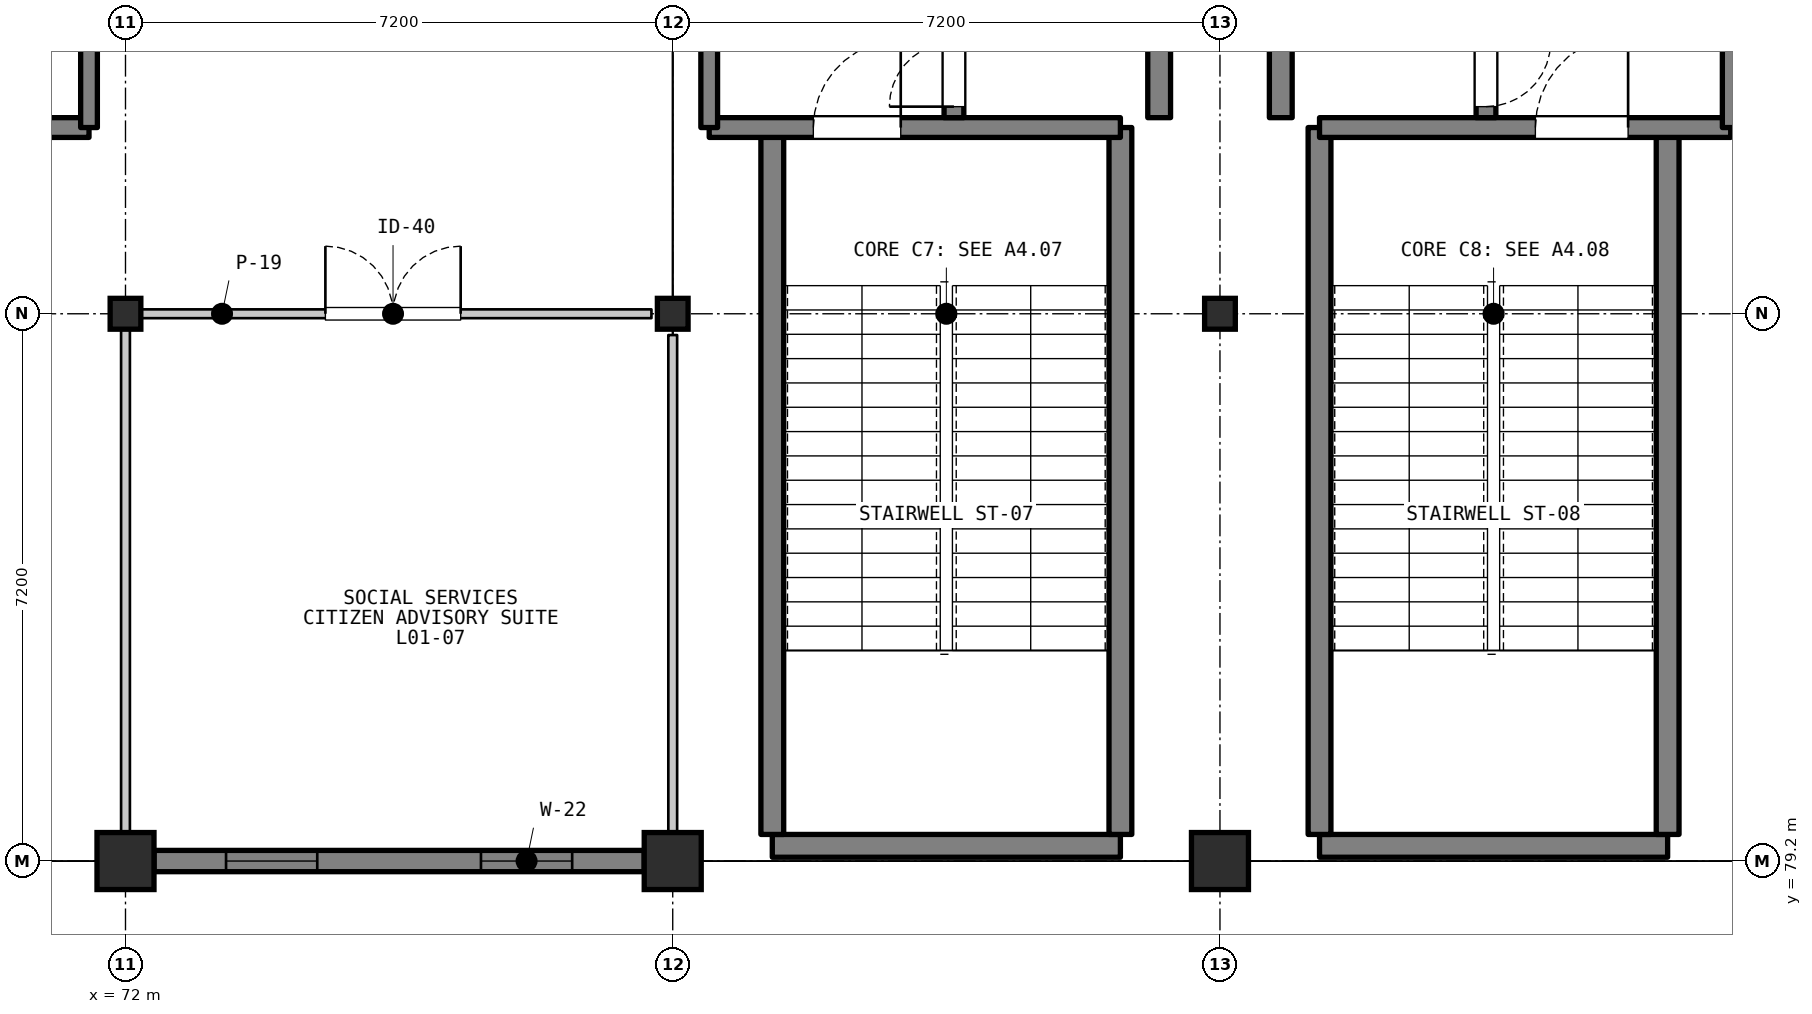
"""IFC4 building model, lengths in metres.
Left out: names, types, materials, properties, quantities, classifications, styles, units other than length and angle.
Written with IfcOpenShell. Run it as: python <this file> out.ifc"""

import sys

from ifc_helpers import new_model, si_unit, direction, frame, frame_2d, origin, origin_2d, place, context, subcontext, project, spatial, rectangle, i_section, extrude, element, fill, save


model = new_model("IFC4")
c1 = context("Model", 3, precision=1e-05, world=origin(), true_north=direction((0.0, 1.0)))
c2 = subcontext(c1, "Body", "Model", "MODEL_VIEW")
j1 = project(units=[si_unit("LENGTHUNIT", "METRE"), si_unit("PLANEANGLEUNIT", "RADIAN")], contexts=[c1])
p1 = place(None, origin())
s1 = spatial("IfcSite", under=j1, at=p1, CompositionType="ELEMENT")
p2 = place(p1, origin())
s2 = spatial("IfcBuilding", under=s1, at=p2, CompositionType="ELEMENT")
p3 = place(p2, origin())
s3 = spatial("IfcBuildingStorey", under=s2, at=p3, CompositionType="ELEMENT", Elevation=0.0)
p4 = place(p3, frame((72.0, 79.2, 0.0), z_axis=(0.0, 0.0, 1.0), x_axis=(1.0, 0.0, 0.0)))
e1 = element("IfcColumn", 1, at=p4, inside=s3, PredefinedType="COLUMN", context=c2, shape_type="SweptSolid", body=[
    extrude(rectangle(XDim=0.75, YDim=0.75, at=origin_2d()), origin(), (0.0, 0.0, 1.0), 5.4),
])
p5 = place(p3, frame((72.0, 86.4, 0.0), z_axis=(0.0, 0.0, 1.0), x_axis=(1.0, 0.0, 0.0)))
e2 = element("IfcColumn", 2, at=p5, inside=s3, PredefinedType="COLUMN", context=c2, shape_type="SweptSolid", body=[
    extrude(i_section(OverallWidth=0.404, OverallDepth=0.406, WebThickness=0.027, FlangeThickness=0.044, FilletRadius=0.015, at=origin_2d()), origin(), (0.0, 0.0, 1.0), 5.4),
])
p6 = place(p3, frame((79.2, 79.2, 0.0), z_axis=(0.0, 0.0, 1.0), x_axis=(1.0, 0.0, 0.0)))
e3 = element("IfcColumn", 3, at=p6, inside=s3, PredefinedType="COLUMN", context=c2, shape_type="SweptSolid", body=[
    extrude(rectangle(XDim=0.75, YDim=0.75, at=origin_2d()), origin(), (0.0, 0.0, 1.0), 5.4),
])
p7 = place(p3, frame((79.2, 86.4, 0.0), z_axis=(0.0, 0.0, 1.0), x_axis=(1.0, 0.0, 0.0)))
e4 = element("IfcColumn", 4, at=p7, inside=s3, PredefinedType="COLUMN", context=c2, shape_type="SweptSolid", body=[
    extrude(i_section(OverallWidth=0.404, OverallDepth=0.406, WebThickness=0.027, FlangeThickness=0.044, FilletRadius=0.015, at=origin_2d()), origin(), (0.0, 0.0, 1.0), 5.4),
])
p8 = place(p3, frame((86.4, 79.2, 0.0), z_axis=(0.0, 0.0, 1.0), x_axis=(1.0, 0.0, 0.0)))
e5 = element("IfcColumn", 5, at=p8, inside=s3, PredefinedType="COLUMN", context=c2, shape_type="SweptSolid", body=[
    extrude(rectangle(XDim=0.75, YDim=0.75, at=origin_2d()), origin(), (0.0, 0.0, 1.0), 5.4),
])
p9 = place(p3, frame((86.4, 86.4, 0.0), z_axis=(0.0, 0.0, 1.0), x_axis=(1.0, 0.0, 0.0)))
e6 = element("IfcColumn", 6, at=p9, inside=s3, PredefinedType="COLUMN", context=c2, shape_type="SweptSolid", body=[
    extrude(i_section(OverallWidth=0.404, OverallDepth=0.406, WebThickness=0.027, FlangeThickness=0.044, FilletRadius=0.015, at=origin_2d()), origin(), (0.0, 0.0, 1.0), 5.4),
])
p10 = place(p3, frame((78.825, 79.2, 0.0), z_axis=(0.0, 0.0, 1.0), x_axis=(-1.0, 0.0, 0.0)))
e7 = element("IfcWall", 7, at=p10, inside=s3, PredefinedType="SOLIDWALL", context=c2, shape_type="SweptSolid", body=[
    extrude(rectangle(XDim=6.45, YDim=0.28, at=frame_2d((3.225, 0.0))), origin(), (0.0, 0.0, 1.0), 4.598),
])
p11 = place(p10, frame((0.948, 0.0, 0.95)))
e8 = element("IfcOpeningElement", 8, at=p11, cuts=e7, PredefinedType="OPENING", context=c2, shape_type="SweptSolid", body=[
    extrude(rectangle(XDim=1.2, YDim=1.7, at=frame_2d((0.6, 0.85))), frame((0.0, 0.15, 0.0), z_axis=(0.0, -1.0, 0.0), x_axis=(1.0, 0.0, 0.0)), (0.0, 0.0, 1.0), 0.3),
])
p12 = place(p10, frame((4.302, 0.0, 0.95)))
e9 = element("IfcOpeningElement", 9, at=p12, cuts=e7, PredefinedType="OPENING", context=c2, shape_type="SweptSolid", body=[
    extrude(rectangle(XDim=1.2, YDim=1.7, at=frame_2d((0.6, 0.85))), frame((0.0, 0.15, 0.0), z_axis=(0.0, -1.0, 0.0), x_axis=(1.0, 0.0, 0.0)), (0.0, 0.0, 1.0), 0.3),
])
p13 = place(p3, frame((66.11, 88.85, 0.0), z_axis=(0.0, 0.0, 1.0), x_axis=(1.0, 0.0, 0.0)))
e10 = element("IfcWall", 10, at=p13, inside=s3, PredefinedType="SHEAR", context=c2, shape_type="SweptSolid", body=[
    extrude(rectangle(XDim=5.41, YDim=0.26, at=frame_2d((2.705, 0.0))), origin(), (0.0, 0.0, 1.0), 5.2),
])
p14 = place(p13, frame((2.84, 0.0, 0.0)))
e11 = element("IfcOpeningElement", 11, at=p14, cuts=e10, PredefinedType="OPENING", context=c2, shape_type="SweptSolid", body=[
    extrude(rectangle(XDim=1.22, YDim=2.15, at=frame_2d((0.61, 1.075))), frame((0.0, 0.14, 0.0), z_axis=(0.0, -1.0, 0.0), x_axis=(1.0, 0.0, 0.0)), (0.0, 0.0, 1.0), 0.28),
])
p15 = place(p3, frame((71.52, 93.3, 0.0), z_axis=(0.0, 0.0, 1.0), x_axis=(0.0, -1.0, 0.0)))
e12 = element("IfcWall", 12, at=p15, inside=s3, PredefinedType="SHEAR", context=c2, shape_type="SweptSolid", body=[
    extrude(rectangle(XDim=4.45, YDim=0.22, at=frame_2d((2.225, 0.0))), origin(), (0.0, 0.0, 1.0), 5.2),
])
p16 = place(p15, frame((1.55, 0.0, 0.0)))
e13 = element("IfcOpeningElement", 13, at=p16, cuts=e12, PredefinedType="OPENING", context=c2, shape_type="SweptSolid", body=[
    extrude(rectangle(XDim=1.6, YDim=2.2, at=frame_2d((0.8, 1.1))), frame((0.0, 0.12, 0.0), z_axis=(0.0, -1.0, 0.0), x_axis=(1.0, 0.0, 0.0)), (0.0, 0.0, 1.0), 0.24),
])
p17 = place(p3, frame((80.51, 79.4, 0.0), z_axis=(0.0, 0.0, 1.0), x_axis=(1.0, 0.0, 0.0)))
e14 = element("IfcWall", 14, at=p17, inside=s3, PredefinedType="SHEAR", context=c2, shape_type="SweptSolid", body=[
    extrude(rectangle(XDim=4.58, YDim=0.3, at=frame_2d((2.29, 0.0))), origin(), (0.0, 0.0, 1.0), 5.2),
])
for number, where, z_axis, x_axis in (
    (15, (80.51, 79.55, 0.0), (0.0, 0.0, 1.0), (0.0, 1.0, 0.0)),
    (16, (85.09, 79.55, 0.0), (0.0, 0.0, 1.0), (0.0, 1.0, 0.0)),
):
    element("IfcWall", number, at=place(p3, frame(where, z_axis=z_axis, x_axis=x_axis)), inside=s3, PredefinedType="SHEAR", context=c2, shape_type="SweptSolid", body=[
        extrude(rectangle(XDim=9.3, YDim=0.3, at=frame_2d((4.65, 0.0))), origin(), (0.0, 0.0, 1.0), 5.2),
    ])
p18 = place(p3, frame((79.68, 88.85, 0.0), z_axis=(0.0, 0.0, 1.0), x_axis=(1.0, 0.0, 0.0)))
e17 = element("IfcWall", 17, at=p18, inside=s3, PredefinedType="SHEAR", context=c2, shape_type="SweptSolid", body=[
    extrude(rectangle(XDim=5.41, YDim=0.26, at=frame_2d((2.705, 0.0))), origin(), (0.0, 0.0, 1.0), 5.2),
])
p19 = place(p18, frame((1.37, 0.0, 0.0)))
e18 = element("IfcOpeningElement", 18, at=p19, cuts=e17, PredefinedType="OPENING", context=c2, shape_type="SweptSolid", body=[
    extrude(rectangle(XDim=1.15, YDim=2.15, at=frame_2d((0.575, 1.075))), frame((0.0, 0.14, 0.0), z_axis=(0.0, -1.0, 0.0), x_axis=(1.0, 0.0, 0.0)), (0.0, 0.0, 1.0), 0.28),
])
p20 = place(p3, frame((85.6, 88.98, 0.0), z_axis=(0.0, 0.0, 1.0), x_axis=(0.0, 1.0, 0.0)))
e19 = element("IfcWall", 19, at=p20, inside=s3, PredefinedType="SHEAR", context=c2, shape_type="SweptSolid", body=[
    extrude(rectangle(XDim=4.32, YDim=0.3, at=frame_2d((2.16, 0.0))), origin(), (0.0, 0.0, 1.0), 5.2),
])
p21 = place(p3, frame((82.9, 88.98, 0.0), z_axis=(0.0, 0.0, 1.0), x_axis=(0.0, 1.0, 0.0)))
e20 = element("IfcWall", 20, at=p21, inside=s3, PredefinedType="SHEAR", context=c2, shape_type="SweptSolid", body=[
    extrude(rectangle(XDim=4.32, YDim=0.26, at=frame_2d((2.16, 0.0))), origin(), (0.0, 0.0, 1.0), 5.2),
])
p22 = place(p21, frame((2.17, 0.0, 0.0)))
e21 = element("IfcOpeningElement", 21, at=p22, cuts=e20, PredefinedType="OPENING", context=c2, shape_type="SweptSolid", body=[
    extrude(rectangle(XDim=1.1, YDim=2.15, at=frame_2d((0.55, 1.075))), frame((0.0, 0.14, 0.0), z_axis=(0.0, -1.0, 0.0), x_axis=(1.0, 0.0, 0.0)), (0.0, 0.0, 1.0), 0.28),
])
p23 = place(p21, frame((0.145, 0.0, 0.0)))
e22 = element("IfcOpeningElement", 22, at=p23, cuts=e20, PredefinedType="OPENING", context=c2, shape_type="SweptSolid", body=[
    extrude(rectangle(XDim=0.85, YDim=2.05, at=frame_2d((0.425, 1.025))), frame((0.0, 0.14, 0.0), z_axis=(0.0, -1.0, 0.0), x_axis=(1.0, 0.0, 0.0)), (0.0, 0.0, 1.0), 0.28),
])
p24 = place(p3, frame((79.68, 88.85, 0.0), z_axis=(0.0, 0.0, 1.0), x_axis=(0.0, 1.0, 0.0)))
e23 = element("IfcWall", 23, at=p24, inside=s3, PredefinedType="SHEAR", context=c2, shape_type="SweptSolid", body=[
    extrude(rectangle(XDim=4.45, YDim=0.22, at=frame_2d((2.225, 0.0))), origin(), (0.0, 0.0, 1.0), 5.2),
])
p25 = place(p24, frame((1.375, 0.0, 0.0)))
e24 = element("IfcOpeningElement", 24, at=p25, cuts=e23, PredefinedType="OPENING", context=c2, shape_type="SweptSolid", body=[
    extrude(rectangle(XDim=1.45, YDim=2.2, at=frame_2d((0.725, 1.1))), frame((0.0, 0.12, 0.0), z_axis=(0.0, -1.0, 0.0), x_axis=(1.0, 0.0, 0.0)), (0.0, 0.0, 1.0), 0.24),
])
p26 = place(p3, frame((87.71, 79.4, 0.0), z_axis=(0.0, 0.0, 1.0), x_axis=(1.0, 0.0, 0.0)))
e25 = element("IfcWall", 25, at=p26, inside=s3, PredefinedType="SHEAR", context=c2, shape_type="SweptSolid", body=[
    extrude(rectangle(XDim=4.58, YDim=0.3, at=frame_2d((2.29, 0.0))), origin(), (0.0, 0.0, 1.0), 5.2),
])
for number, where, z_axis, x_axis in (
    (26, (87.71, 79.55, 0.0), (0.0, 0.0, 1.0), (0.0, 1.0, 0.0)),
    (27, (92.29, 79.55, 0.0), (0.0, 0.0, 1.0), (0.0, 1.0, 0.0)),
):
    element("IfcWall", number, at=place(p3, frame(where, z_axis=z_axis, x_axis=x_axis)), inside=s3, PredefinedType="SHEAR", context=c2, shape_type="SweptSolid", body=[
        extrude(rectangle(XDim=9.3, YDim=0.3, at=frame_2d((4.65, 0.0))), origin(), (0.0, 0.0, 1.0), 5.2),
    ])
p27 = place(p3, frame((87.71, 88.85, 0.0), z_axis=(0.0, 0.0, 1.0), x_axis=(1.0, 0.0, 0.0)))
e28 = element("IfcWall", 28, at=p27, inside=s3, PredefinedType="SHEAR", context=c2, shape_type="SweptSolid", body=[
    extrude(rectangle(XDim=5.41, YDim=0.26, at=frame_2d((2.705, 0.0))), origin(), (0.0, 0.0, 1.0), 5.2),
])
p28 = place(p27, frame((2.84, 0.0, 0.0)))
e29 = element("IfcOpeningElement", 29, at=p28, cuts=e28, PredefinedType="OPENING", context=c2, shape_type="SweptSolid", body=[
    extrude(rectangle(XDim=1.22, YDim=2.15, at=frame_2d((0.61, 1.075))), frame((0.0, 0.14, 0.0), z_axis=(0.0, -1.0, 0.0), x_axis=(1.0, 0.0, 0.0)), (0.0, 0.0, 1.0), 0.28),
])
p29 = place(p3, frame((87.2, 88.98, 0.0), z_axis=(0.0, 0.0, 1.0), x_axis=(0.0, 1.0, 0.0)))
e30 = element("IfcWall", 30, at=p29, inside=s3, PredefinedType="SHEAR", context=c2, shape_type="SweptSolid", body=[
    extrude(rectangle(XDim=4.32, YDim=0.3, at=frame_2d((2.16, 0.0))), origin(), (0.0, 0.0, 1.0), 5.2),
])
p30 = place(p3, frame((89.9, 93.3, 0.0), z_axis=(0.0, 0.0, 1.0), x_axis=(0.0, -1.0, 0.0)))
e31 = element("IfcWall", 31, at=p30, inside=s3, PredefinedType="SHEAR", context=c2, shape_type="SweptSolid", body=[
    extrude(rectangle(XDim=4.32, YDim=0.26, at=frame_2d((2.16, 0.0))), origin(), (0.0, 0.0, 1.0), 5.2),
])
p31 = place(p30, frame((1.0, 0.0, 0.0)))
e32 = element("IfcOpeningElement", 32, at=p31, cuts=e31, PredefinedType="OPENING", context=c2, shape_type="SweptSolid", body=[
    extrude(rectangle(XDim=1.2, YDim=2.15, at=frame_2d((0.6, 1.075))), frame((0.0, 0.14, 0.0), z_axis=(0.0, -1.0, 0.0), x_axis=(1.0, 0.0, 0.0)), (0.0, 0.0, 1.0), 0.28),
])
p32 = place(p30, frame((3.325, 0.0, 0.0)))
e33 = element("IfcOpeningElement", 33, at=p32, cuts=e31, PredefinedType="OPENING", context=c2, shape_type="SweptSolid", body=[
    extrude(rectangle(XDim=0.85, YDim=2.05, at=frame_2d((0.425, 1.025))), frame((0.0, 0.14, 0.0), z_axis=(0.0, -1.0, 0.0), x_axis=(1.0, 0.0, 0.0)), (0.0, 0.0, 1.0), 0.28),
])
p33 = place(p3, frame((93.12, 93.3, 0.0), z_axis=(0.0, 0.0, 1.0), x_axis=(0.0, -1.0, 0.0)))
e34 = element("IfcWall", 34, at=p33, inside=s3, PredefinedType="SHEAR", context=c2, shape_type="SweptSolid", body=[
    extrude(rectangle(XDim=4.45, YDim=0.22, at=frame_2d((2.225, 0.0))), origin(), (0.0, 0.0, 1.0), 5.2),
])
p34 = place(p33, frame((1.55, 0.0, 0.0)))
e35 = element("IfcOpeningElement", 35, at=p34, cuts=e34, PredefinedType="OPENING", context=c2, shape_type="SweptSolid", body=[
    extrude(rectangle(XDim=1.6, YDim=2.2, at=frame_2d((0.8, 1.1))), frame((0.0, 0.12, 0.0), z_axis=(0.0, -1.0, 0.0), x_axis=(1.0, 0.0, 0.0)), (0.0, 0.0, 1.0), 0.24),
])
p35 = place(p3, frame((72.12, 86.4, 0.0), z_axis=(0.0, 0.0, 1.0), x_axis=(1.0, 0.0, 0.0)))
e36 = element("IfcWall", 36, at=p35, inside=s3, PredefinedType="PARTITIONING", context=c2, shape_type="SweptSolid", body=[
    extrude(rectangle(XDim=6.8, YDim=0.116, at=frame_2d((3.4, 0.0))), origin(), (0.0, 0.0, 1.0), 4.588),
])
p36 = place(p35, frame((2.51, 0.0, 0.0)))
e37 = element("IfcOpeningElement", 37, at=p36, cuts=e36, PredefinedType="OPENING", context=c2, shape_type="SweptSolid", body=[
    extrude(rectangle(XDim=1.78, YDim=2.36, at=frame_2d((0.89, 1.18))), frame((0.0, 0.068, 0.0), z_axis=(0.0, -1.0, 0.0), x_axis=(1.0, 0.0, 0.0)), (0.0, 0.0, 1.0), 0.136),
])
p37 = place(p3, frame((72.0, 79.32, 0.0), z_axis=(0.0, 0.0, 1.0), x_axis=(0.0, 1.0, 0.0)))
e38 = element("IfcWall", 38, at=p37, inside=s3, PredefinedType="PARTITIONING", context=c2, shape_type="SweptSolid", body=[
    extrude(rectangle(XDim=6.96, YDim=0.116, at=frame_2d((3.48, 0.0))), origin(), (0.0, 0.0, 1.0), 4.588),
])
p38 = place(p3, frame((79.2, 86.12, 0.0), z_axis=(0.0, 0.0, 1.0), x_axis=(0.0, -1.0, 0.0)))
e39 = element("IfcWall", 39, at=p38, inside=s3, PredefinedType="PARTITIONING", context=c2, shape_type="SweptSolid", body=[
    extrude(rectangle(XDim=6.64, YDim=0.116, at=frame_2d((3.32, 0.0))), origin(), (0.0, 0.0, 1.0), 4.657),
])
p39 = place(p11, origin())
e40 = element("IfcWindow", 40, at=p39, inside=s3, PartitioningType="SINGLE_PANEL", PredefinedType="WINDOW", context=c2, shape_type="SweptSolid", body=[
    extrude(rectangle(XDim=1.2, YDim=1.7, at=frame_2d((0.6, 0.85))), frame((0.0, 0.03, 0.0), z_axis=(0.0, -1.0, 0.0), x_axis=(1.0, 0.0, 0.0)), (0.0, 0.0, 1.0), 0.06),
])
fill(e8, e40)
p40 = place(p12, origin())
e41 = element("IfcWindow", 41, at=p40, inside=s3, PartitioningType="SINGLE_PANEL", PredefinedType="WINDOW", context=c2, shape_type="SweptSolid", body=[
    extrude(rectangle(XDim=1.2, YDim=1.7, at=frame_2d((0.6, 0.85))), frame((0.0, 0.03, 0.0), z_axis=(0.0, -1.0, 0.0), x_axis=(1.0, 0.0, 0.0)), (0.0, 0.0, 1.0), 0.06),
])
fill(e9, e41)
p41 = place(p19, origin())
e42 = element("IfcDoor", 42, at=p41, inside=s3, OperationType="SINGLE_SWING_RIGHT", PredefinedType="DOOR", context=c2, shape_type="SweptSolid", body=[
    extrude(rectangle(XDim=1.15, YDim=2.15, at=frame_2d((0.575, 1.075))), frame((0.0, 0.025, 0.0), z_axis=(0.0, -1.0, 0.0), x_axis=(1.0, 0.0, 0.0)), (0.0, 0.0, 1.0), 0.05),
])
fill(e18, e42)
p42 = place(p23, origin())
e43 = element("IfcDoor", 43, at=p42, inside=s3, OperationType="SINGLE_SWING_LEFT", PredefinedType="DOOR", context=c2, shape_type="SweptSolid", body=[
    extrude(rectangle(XDim=0.85, YDim=2.05, at=frame_2d((0.425, 1.025))), frame((0.0, 0.025, 0.0), z_axis=(0.0, -1.0, 0.0), x_axis=(1.0, 0.0, 0.0)), (0.0, 0.0, 1.0), 0.05),
])
fill(e22, e43)
p43 = place(p28, origin())
e44 = element("IfcDoor", 44, at=p43, inside=s3, OperationType="SINGLE_SWING_RIGHT", PredefinedType="DOOR", context=c2, shape_type="SweptSolid", body=[
    extrude(rectangle(XDim=1.22, YDim=2.15, at=frame_2d((0.61, 1.075))), frame((0.0, 0.025, 0.0), z_axis=(0.0, -1.0, 0.0), x_axis=(1.0, 0.0, 0.0)), (0.0, 0.0, 1.0), 0.05),
])
fill(e29, e44)
p44 = place(p32, origin())
e45 = element("IfcDoor", 45, at=p44, inside=s3, OperationType="SINGLE_SWING_LEFT", PredefinedType="DOOR", context=c2, shape_type="SweptSolid", body=[
    extrude(rectangle(XDim=0.85, YDim=2.05, at=frame_2d((0.425, 1.025))), frame((0.0, 0.025, 0.0), z_axis=(0.0, -1.0, 0.0), x_axis=(1.0, 0.0, 0.0)), (0.0, 0.0, 1.0), 0.05),
])
fill(e33, e45)
p45 = place(p36, origin())
e46 = element("IfcDoor", 46, at=p45, inside=s3, OperationType="DOUBLE_DOOR_SINGLE_SWING", PredefinedType="DOOR", context=c2, shape_type="SweptSolid", body=[
    extrude(rectangle(XDim=1.78, YDim=2.36, at=frame_2d((0.89, 1.18))), frame((0.0, 0.025, 0.0), z_axis=(0.0, -1.0, 0.0), x_axis=(1.0, 0.0, 0.0)), (0.0, 0.0, 1.0), 0.05),
])
fill(e37, e46)
save(model, sys.argv[1])
